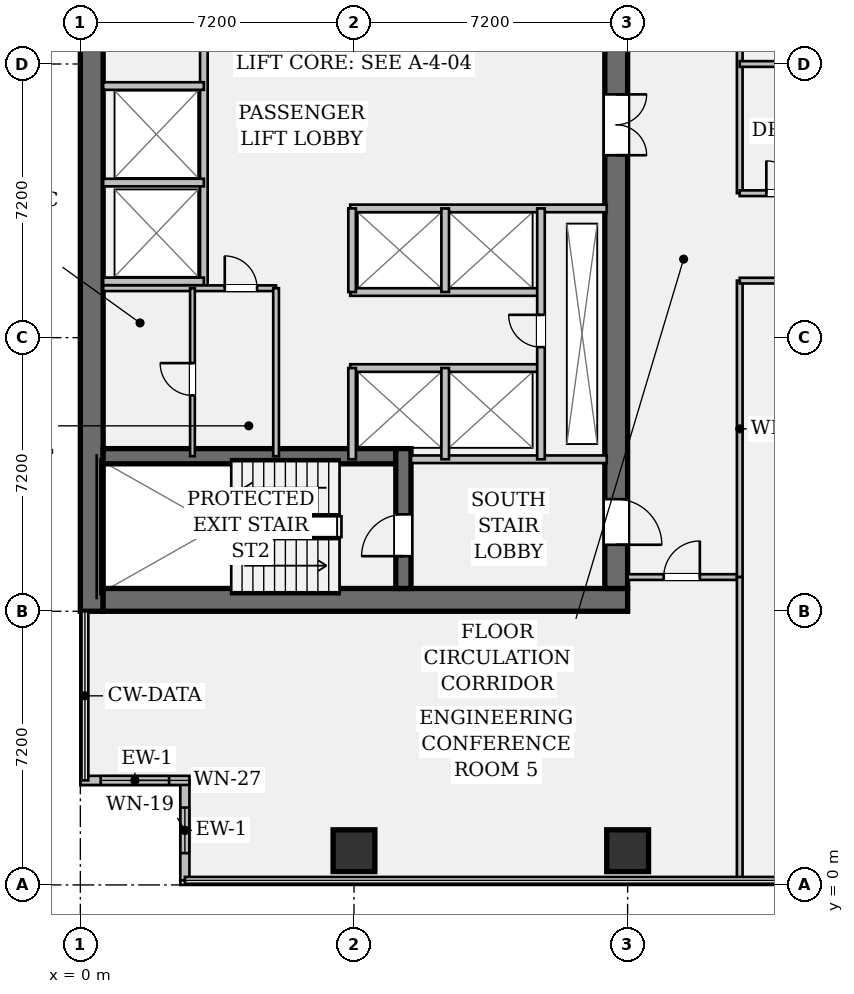
"""IFC4 building model, lengths in metres.
Left out: names, types, materials, properties, quantities, classifications, styles, units other than length and angle.
Written with IfcOpenShell. Run it as: python <this file> out.ifc"""

import sys

from ifc_helpers import new_model, si_unit, direction, frame, frame_2d, origin, origin_2d, place, context, subcontext, project, spatial, rectangle, hollow_rectangle, extrude, element, fill, save


model = new_model("IFC4")
c1 = context("Model", 3, precision=1e-05, world=origin(), true_north=direction((0.0, 1.0)))
c2 = subcontext(c1, "Body", "Model", "MODEL_VIEW")
j1 = project(units=[si_unit("LENGTHUNIT", "METRE"), si_unit("PLANEANGLEUNIT", "RADIAN")], contexts=[c1])
p1 = place(None, origin())
s1 = spatial("IfcSite", under=j1, at=p1, CompositionType="ELEMENT")
p2 = place(p1, origin())
s2 = spatial("IfcBuilding", under=s1, at=p2, CompositionType="ELEMENT")
p3 = place(p2, frame((0.0, 0.0, 42.7)))
s3 = spatial("IfcBuildingStorey", under=s2, at=p3, CompositionType="ELEMENT", Elevation=42.7)
p4 = place(p3, frame((0.3, 7.2, 0.0), z_axis=(0.0, 0.0, 1.0), x_axis=(0.0, 1.0, 0.0)))
e1 = element("IfcWall", 1, at=p4, inside=s3, PredefinedType="SHEAR", context=c2, shape_type="SweptSolid", body=[
    extrude(rectangle(XDim=28.8, YDim=0.6, at=frame_2d((14.4, 0.0))), origin(), (0.0, 0.0, 1.0), 3.57),
])
p5 = place(p3, frame((0.6, 7.5, 0.0), z_axis=(0.0, 0.0, 1.0), x_axis=(1.0, 0.0, 0.0)))
e2 = element("IfcWall", 2, at=p5, inside=s3, PredefinedType="SHEAR", context=c2, shape_type="SweptSolid", body=[
    extrude(rectangle(XDim=13.8, YDim=0.6, at=frame_2d((6.9, 0.0))), origin(), (0.0, 0.0, 1.0), 3.57),
])
p6 = place(p3, frame((14.1, 35.4, 0.0), z_axis=(0.0, 0.0, 1.0), x_axis=(0.0, -1.0, 0.0)))
e3 = element("IfcWall", 3, at=p6, inside=s3, PredefinedType="SHEAR", context=c2, shape_type="SweptSolid", body=[
    extrude(rectangle(XDim=27.6, YDim=0.6, at=frame_2d((13.8, 0.0))), origin(), (0.0, 0.0, 1.0), 3.57),
])
p7 = place(p6, frame((1.3, 0.0, 0.0)))
e4 = element("IfcOpeningElement", 4, at=p7, cuts=e3, PredefinedType="OPENING", context=c2, shape_type="SweptSolid", body=[
    extrude(rectangle(XDim=1.2, YDim=2.15, at=frame_2d((0.6, 1.075))), frame((0.0, 0.312, 0.0), z_axis=(0.0, -1.0, 0.0), x_axis=(1.0, 0.0, 0.0)), (0.0, 0.0, 1.0), 0.624),
])
p8 = place(p6, frame((25.25, 0.0, 0.0)))
e5 = element("IfcOpeningElement", 5, at=p8, cuts=e3, PredefinedType="OPENING", context=c2, shape_type="SweptSolid", body=[
    extrude(rectangle(XDim=1.2, YDim=2.15, at=frame_2d((0.6, 1.075))), frame((0.0, 0.312, 0.0), z_axis=(0.0, -1.0, 0.0), x_axis=(1.0, 0.0, 0.0)), (0.0, 0.0, 1.0), 0.624),
])
p9 = place(p6, frame((14.6, 0.0, 0.0)))
e6 = element("IfcOpeningElement", 6, at=p9, cuts=e3, PredefinedType="OPENING", context=c2, shape_type="SweptSolid", body=[
    extrude(rectangle(XDim=1.6, YDim=2.2, at=frame_2d((0.8, 1.1))), frame((0.0, 0.312, 0.0), z_axis=(0.0, -1.0, 0.0), x_axis=(1.0, 0.0, 0.0)), (0.0, 0.0, 1.0), 0.624),
])
p10 = place(p3, frame((0.6, 11.28, 0.0), z_axis=(0.0, 0.0, 1.0), x_axis=(1.0, 0.0, 0.0)))
e7 = element("IfcWall", 7, at=p10, inside=s3, PredefinedType="SHEAR", context=c2, shape_type="SweptSolid", body=[
    extrude(rectangle(XDim=7.7, YDim=0.4, at=frame_2d((3.85, 0.0))), origin(), (0.0, 0.0, 1.0), 3.57),
])
p11 = place(p3, frame((8.5, 7.8, 0.0), z_axis=(0.0, 0.0, 1.0), x_axis=(0.0, 1.0, 0.0)))
e8 = element("IfcWall", 8, at=p11, inside=s3, PredefinedType="SHEAR", context=c2, shape_type="SweptSolid", body=[
    extrude(rectangle(XDim=3.68, YDim=0.4, at=frame_2d((1.84, 0.0))), origin(), (0.0, 0.0, 1.0), 3.57),
])
p12 = place(p11, frame((0.85, 0.0, 0.0)))
e9 = element("IfcOpeningElement", 9, at=p12, cuts=e8, PredefinedType="OPENING", context=c2, shape_type="SweptSolid", body=[
    extrude(rectangle(XDim=1.1, YDim=2.15, at=frame_2d((0.55, 1.075))), frame((0.0, 0.212, 0.0), z_axis=(0.0, -1.0, 0.0), x_axis=(1.0, 0.0, 0.0)), (0.0, 0.0, 1.0), 0.424),
])
for number, where, z_axis, x_axis in (
    (10, (7.2, 0.9, 0.0), (0.0, 0.0, 1.0), (1.0, 0.0, 0.0)),
    (11, (14.4, 0.9, 0.0), (0.0, 0.0, 1.0), (1.0, 0.0, 0.0)),
):
    element("IfcColumn", number, at=place(p3, frame(where, z_axis=z_axis, x_axis=x_axis)), inside=s3, PredefinedType="COLUMN", context=c2, shape_type="SweptSolid", body=[
        extrude(hollow_rectangle(XDim=1.1, YDim=1.1, WallThickness=0.07, at=origin_2d()), origin(), (0.0, 0.0, 1.0), 3.57),
    ])
p13 = place(p3, frame((2.75, 0.12, 0.0), z_axis=(0.0, 0.0, 1.0), x_axis=(0.0, 1.0, 0.0)))
e12 = element("IfcWall", 12, at=p13, inside=s3, PredefinedType="STANDARD", context=c2, shape_type="SweptSolid", body=[
    extrude(rectangle(XDim=2.63, YDim=0.24, at=frame_2d((1.315, 0.0))), origin(), (0.0, 0.0, 1.0), 3.57),
])
p14 = place(p13, frame((0.715, 0.0, 0.95)))
e13 = element("IfcOpeningElement", 13, at=p14, cuts=e12, PredefinedType="OPENING", context=c2, shape_type="SweptSolid", body=[
    extrude(rectangle(XDim=1.2, YDim=1.8, at=frame_2d((0.6, 0.9))), frame((0.0, 0.132, 0.0), z_axis=(0.0, -1.0, 0.0), x_axis=(1.0, 0.0, 0.0)), (0.0, 0.0, 1.0), 0.264),
])
p15 = place(p3, frame((2.87, 2.75, 0.0), z_axis=(0.0, 0.0, 1.0), x_axis=(-1.0, 0.0, 0.0)))
e14 = element("IfcWall", 14, at=p15, inside=s3, PredefinedType="STANDARD", context=c2, shape_type="SweptSolid", body=[
    extrude(rectangle(XDim=2.87, YDim=0.24, at=frame_2d((1.435, 0.0))), origin(), (0.0, 0.0, 1.0), 3.57),
])
p16 = place(p15, frame((0.535, 0.0, 0.95)))
e15 = element("IfcOpeningElement", 15, at=p16, cuts=e14, PredefinedType="OPENING", context=c2, shape_type="SweptSolid", body=[
    extrude(rectangle(XDim=1.8, YDim=1.35, at=frame_2d((0.9, 0.675))), frame((0.0, 0.132, 0.0), z_axis=(0.0, -1.0, 0.0), x_axis=(1.0, 0.0, 0.0)), (0.0, 0.0, 1.0), 0.264),
])
p17 = place(p3, frame((8.7, 11.2, 0.0), z_axis=(0.0, 0.0, 1.0), x_axis=(1.0, 0.0, 0.0)))
e16 = element("IfcWall", 16, at=p17, inside=s3, PredefinedType="PARTITIONING", context=c2, shape_type="SweptSolid", body=[
    extrude(rectangle(XDim=5.15, YDim=0.2, at=frame_2d((2.575, 0.0))), origin(), (0.0, 0.0, 1.0), 3.57),
])
p18 = place(p3, frame((3.25, 15.7, 0.0), z_axis=(0.0, 0.0, 1.0), x_axis=(0.0, 1.0, 0.0)))
e17 = element("IfcWall", 17, at=p18, inside=s3, PredefinedType="PARTITIONING", context=c2, shape_type="SweptSolid", body=[
    extrude(rectangle(XDim=13.08, YDim=0.2, at=frame_2d((6.54, 0.0))), origin(), (0.0, 0.0, 1.0), 3.57),
])
for number, where, z_axis, x_axis in (
    (18, (0.6, 15.88, 0.0), (0.0, 0.0, 1.0), (1.0, 0.0, 0.0)),
    (19, (0.6, 18.48, 0.0), (0.0, 0.0, 1.0), (1.0, 0.0, 0.0)),
    (20, (0.6, 21.02, 0.0), (0.0, 0.0, 1.0), (1.0, 0.0, 0.0)),
):
    element("IfcWall", number, at=place(p3, frame(where, z_axis=z_axis, x_axis=x_axis)), inside=s3, PredefinedType="PARTITIONING", context=c2, shape_type="SweptSolid", body=[
        extrude(rectangle(XDim=2.65, YDim=0.2, at=frame_2d((1.325, 0.0))), origin(), (0.0, 0.0, 1.0), 3.57),
    ])
p19 = place(p3, frame((7.1, 17.8, 0.0), z_axis=(0.0, 0.0, 1.0), x_axis=(1.0, 0.0, 0.0)))
e21 = element("IfcWall", 21, at=p19, inside=s3, PredefinedType="PARTITIONING", context=c2, shape_type="SweptSolid", body=[
    extrude(rectangle(XDim=6.75, YDim=0.2, at=frame_2d((3.375, 0.0))), origin(), (0.0, 0.0, 1.0), 3.57),
])
for number, where, z_axis, x_axis in (
    (22, (7.1, 15.6, 0.0), (0.0, 0.0, 1.0), (1.0, 0.0, 0.0)),
    (23, (7.1, 13.6, 0.0), (0.0, 0.0, 1.0), (1.0, 0.0, 0.0)),
):
    element("IfcWall", number, at=place(p3, frame(where, z_axis=z_axis, x_axis=x_axis)), inside=s3, PredefinedType="PARTITIONING", context=c2, shape_type="SweptSolid", body=[
        extrude(rectangle(XDim=5.02, YDim=0.2, at=frame_2d((2.51, 0.0))), origin(), (0.0, 0.0, 1.0), 3.57),
    ])
p20 = place(p3, frame((7.15, 15.6, 0.0), z_axis=(0.0, 0.0, 1.0), x_axis=(0.0, 1.0, 0.0)))
e24 = element("IfcWall", 24, at=p20, inside=s3, PredefinedType="PARTITIONING", context=c2, shape_type="SweptSolid", body=[
    extrude(rectangle(XDim=2.2, YDim=0.2, at=frame_2d((1.1, 0.0))), origin(), (0.0, 0.0, 1.0), 3.57),
])
p21 = place(p3, frame((7.15, 11.2, 0.0), z_axis=(0.0, 0.0, 1.0), x_axis=(0.0, 1.0, 0.0)))
e25 = element("IfcWall", 25, at=p21, inside=s3, PredefinedType="PARTITIONING", context=c2, shape_type="SweptSolid", body=[
    extrude(rectangle(XDim=2.4, YDim=0.2, at=frame_2d((1.2, 0.0))), origin(), (0.0, 0.0, 1.0), 3.57),
])
p22 = place(p3, frame((9.6, 15.6, 0.0), z_axis=(0.0, 0.0, 1.0), x_axis=(0.0, 1.0, 0.0)))
e26 = element("IfcWall", 26, at=p22, inside=s3, PredefinedType="PARTITIONING", context=c2, shape_type="SweptSolid", body=[
    extrude(rectangle(XDim=2.2, YDim=0.2, at=frame_2d((1.1, 0.0))), origin(), (0.0, 0.0, 1.0), 3.57),
])
p23 = place(p3, frame((9.6, 11.2, 0.0), z_axis=(0.0, 0.0, 1.0), x_axis=(0.0, 1.0, 0.0)))
e27 = element("IfcWall", 27, at=p23, inside=s3, PredefinedType="PARTITIONING", context=c2, shape_type="SweptSolid", body=[
    extrude(rectangle(XDim=2.4, YDim=0.2, at=frame_2d((1.2, 0.0))), origin(), (0.0, 0.0, 1.0), 3.57),
])
p24 = place(p3, frame((12.12, 11.2, 0.0), z_axis=(0.0, 0.0, 1.0), x_axis=(0.0, 1.0, 0.0)))
e28 = element("IfcWall", 28, at=p24, inside=s3, PredefinedType="PARTITIONING", context=c2, shape_type="SweptSolid", body=[
    extrude(rectangle(XDim=6.6, YDim=0.2, at=frame_2d((3.3, 0.0))), origin(), (0.0, 0.0, 1.0), 3.57),
])
p25 = place(p24, frame((2.95, 0.0, 0.0)))
e29 = element("IfcOpeningElement", 29, at=p25, cuts=e28, PredefinedType="OPENING", context=c2, shape_type="SweptSolid", body=[
    extrude(rectangle(XDim=0.85, YDim=2.15, at=frame_2d((0.425, 1.075))), frame((0.0, 0.112, 0.0), z_axis=(0.0, -1.0, 0.0), x_axis=(1.0, 0.0, 0.0)), (0.0, 0.0, 1.0), 0.224),
])
p26 = place(p3, frame((0.6, 15.7, 0.0), z_axis=(0.0, 0.0, 1.0), x_axis=(1.0, 0.0, 0.0)))
e30 = element("IfcWall", 30, at=p26, inside=s3, PredefinedType="PARTITIONING", context=c2, shape_type="SweptSolid", body=[
    extrude(rectangle(XDim=4.55, YDim=0.15, at=frame_2d((2.275, 0.0))), origin(), (0.0, 0.0, 1.0), 3.57),
])
p27 = place(p26, frame((3.2, 0.0, 0.0)))
e31 = element("IfcOpeningElement", 31, at=p27, cuts=e30, PredefinedType="OPENING", context=c2, shape_type="SweptSolid", body=[
    extrude(rectangle(XDim=0.85, YDim=2.15, at=frame_2d((0.425, 1.075))), frame((0.0, 0.087, 0.0), z_axis=(0.0, -1.0, 0.0), x_axis=(1.0, 0.0, 0.0)), (0.0, 0.0, 1.0), 0.174),
])
p28 = place(p3, frame((5.15, 11.28, 0.0), z_axis=(0.0, 0.0, 1.0), x_axis=(0.0, 1.0, 0.0)))
e32 = element("IfcWall", 32, at=p28, inside=s3, PredefinedType="PARTITIONING", context=c2, shape_type="SweptSolid", body=[
    extrude(rectangle(XDim=4.42, YDim=0.15, at=frame_2d((2.21, 0.0))), origin(), (0.0, 0.0, 1.0), 3.57),
])
p29 = place(p3, frame((2.95, 11.28, 0.0), z_axis=(0.0, 0.0, 1.0), x_axis=(0.0, 1.0, 0.0)))
e33 = element("IfcWall", 33, at=p29, inside=s3, PredefinedType="PARTITIONING", context=c2, shape_type="SweptSolid", body=[
    extrude(rectangle(XDim=4.42, YDim=0.125, at=frame_2d((2.21, 0.0))), origin(), (0.0, 0.0, 1.0), 3.57),
])
p30 = place(p29, frame((1.6, 0.0, 0.0)))
e34 = element("IfcOpeningElement", 34, at=p30, cuts=e33, PredefinedType="OPENING", context=c2, shape_type="SweptSolid", body=[
    extrude(rectangle(XDim=0.85, YDim=2.15, at=frame_2d((0.425, 1.075))), frame((0.0, 0.074, 0.0), z_axis=(0.0, -1.0, 0.0), x_axis=(1.0, 0.0, 0.0)), (0.0, 0.0, 1.0), 0.149),
])
p31 = place(p3, frame((14.4, 8.1, 0.0), z_axis=(0.0, 0.0, 1.0), x_axis=(1.0, 0.0, 0.0)))
e35 = element("IfcWall", 35, at=p31, inside=s3, PredefinedType="PARTITIONING", context=c2, shape_type="SweptSolid", body=[
    extrude(rectangle(XDim=2.95, YDim=0.15, at=frame_2d((1.475, 0.0))), origin(), (0.0, 0.0, 1.0), 3.088),
])
p32 = place(p31, frame((0.95, 0.0, 0.0)))
e36 = element("IfcOpeningElement", 36, at=p32, cuts=e35, PredefinedType="OPENING", context=c2, shape_type="SweptSolid", body=[
    extrude(rectangle(XDim=0.95, YDim=2.15, at=frame_2d((0.475, 1.075))), frame((0.0, 0.087, 0.0), z_axis=(0.0, -1.0, 0.0), x_axis=(1.0, 0.0, 0.0)), (0.0, 0.0, 1.0), 0.174),
])
p33 = place(p3, frame((17.35, 8.1, 0.0), z_axis=(0.0, 0.0, 1.0), x_axis=(0.0, 1.0, 0.0)))
e37 = element("IfcWall", 37, at=p33, inside=s3, PredefinedType="PARTITIONING", context=c2, shape_type="SweptSolid", body=[
    extrude(rectangle(XDim=7.8, YDim=0.15, at=frame_2d((3.9, 0.0))), origin(), (0.0, 0.0, 1.0), 2.699),
])
p34 = place(p3, frame((17.35, 18.2, 0.0), z_axis=(0.0, 0.0, 1.0), x_axis=(0.0, 1.0, 0.0)))
e38 = element("IfcWall", 38, at=p34, inside=s3, PredefinedType="PARTITIONING", context=c2, shape_type="SweptSolid", body=[
    extrude(rectangle(XDim=17.7, YDim=0.15, at=frame_2d((8.85, 0.0))), origin(), (0.0, 0.0, 1.0), 2.699),
])
p35 = place(p34, frame((4.3, 0.0, 0.0)))
e39 = element("IfcOpeningElement", 39, at=p35, cuts=e38, PredefinedType="OPENING", context=c2, shape_type="SweptSolid", body=[
    extrude(rectangle(XDim=0.95, YDim=2.15, at=frame_2d((0.475, 1.075))), frame((0.0, 0.087, 0.0), z_axis=(0.0, -1.0, 0.0), x_axis=(1.0, 0.0, 0.0)), (0.0, 0.0, 1.0), 0.174),
])
p36 = place(p34, frame((8.4, 0.0, 0.0)))
e40 = element("IfcOpeningElement", 40, at=p36, cuts=e38, PredefinedType="OPENING", context=c2, shape_type="SweptSolid", body=[
    extrude(rectangle(XDim=1.0, YDim=2.15, at=frame_2d((0.5, 1.075))), frame((0.0, 0.087, 0.0), z_axis=(0.0, -1.0, 0.0), x_axis=(1.0, 0.0, 0.0)), (0.0, 0.0, 1.0), 0.174),
])
p37 = place(p3, frame((17.35, 15.9, 0.0), z_axis=(0.0, 0.0, 1.0), x_axis=(1.0, 0.0, 0.0)))
e41 = element("IfcWall", 41, at=p37, inside=s3, PredefinedType="PARTITIONING", context=c2, shape_type="SweptSolid", body=[
    extrude(rectangle(XDim=18.05, YDim=0.15, at=frame_2d((9.025, 0.0))), origin(), (0.0, 0.0, 1.0), 2.699),
])
p38 = place(p37, frame((2.82, 0.0, 0.0)))
e42 = element("IfcOpeningElement", 42, at=p38, cuts=e41, PredefinedType="OPENING", context=c2, shape_type="SweptSolid", body=[
    extrude(rectangle(XDim=0.95, YDim=2.15, at=frame_2d((0.475, 1.075))), frame((0.0, 0.087, 0.0), z_axis=(0.0, -1.0, 0.0), x_axis=(1.0, 0.0, 0.0)), (0.0, 0.0, 1.0), 0.174),
])
p39 = place(p37, frame((9.75, 0.0, 0.0)))
e43 = element("IfcOpeningElement", 43, at=p39, cuts=e41, PredefinedType="OPENING", context=c2, shape_type="SweptSolid", body=[
    extrude(rectangle(XDim=0.95, YDim=2.15, at=frame_2d((0.475, 1.075))), frame((0.0, 0.087, 0.0), z_axis=(0.0, -1.0, 0.0), x_axis=(1.0, 0.0, 0.0)), (0.0, 0.0, 1.0), 0.174),
])
p40 = place(p37, frame((15.45, 0.0, 0.0)))
e44 = element("IfcOpeningElement", 44, at=p40, cuts=e41, PredefinedType="OPENING", context=c2, shape_type="SweptSolid", body=[
    extrude(rectangle(XDim=0.95, YDim=2.15, at=frame_2d((0.475, 1.075))), frame((0.0, 0.087, 0.0), z_axis=(0.0, -1.0, 0.0), x_axis=(1.0, 0.0, 0.0)), (0.0, 0.0, 1.0), 0.174),
])
p41 = place(p3, frame((17.35, 18.2, 0.0), z_axis=(0.0, 0.0, 1.0), x_axis=(1.0, 0.0, 0.0)))
e45 = element("IfcWall", 45, at=p41, inside=s3, PredefinedType="PARTITIONING", context=c2, shape_type="SweptSolid", body=[
    extrude(rectangle(XDim=18.05, YDim=0.15, at=frame_2d((9.025, 0.0))), origin(), (0.0, 0.0, 1.0), 2.699),
])
p42 = place(p41, frame((0.7, 0.0, 0.0)))
e46 = element("IfcOpeningElement", 46, at=p42, cuts=e45, PredefinedType="OPENING", context=c2, shape_type="SweptSolid", body=[
    extrude(rectangle(XDim=0.85, YDim=2.15, at=frame_2d((0.425, 1.075))), frame((0.0, 0.087, 0.0), z_axis=(0.0, -1.0, 0.0), x_axis=(1.0, 0.0, 0.0)), (0.0, 0.0, 1.0), 0.174),
])
p43 = place(p41, frame((3.95, 0.0, 0.0)))
e47 = element("IfcOpeningElement", 47, at=p43, cuts=e45, PredefinedType="OPENING", context=c2, shape_type="SweptSolid", body=[
    extrude(rectangle(XDim=0.85, YDim=2.15, at=frame_2d((0.425, 1.075))), frame((0.0, 0.087, 0.0), z_axis=(0.0, -1.0, 0.0), x_axis=(1.0, 0.0, 0.0)), (0.0, 0.0, 1.0), 0.174),
])
p44 = place(p41, frame((6.46, 0.0, 0.0)))
e48 = element("IfcOpeningElement", 48, at=p44, cuts=e45, PredefinedType="OPENING", context=c2, shape_type="SweptSolid", body=[
    extrude(rectangle(XDim=0.85, YDim=2.15, at=frame_2d((0.425, 1.075))), frame((0.0, 0.087, 0.0), z_axis=(0.0, -1.0, 0.0), x_axis=(1.0, 0.0, 0.0)), (0.0, 0.0, 1.0), 0.174),
])
p45 = place(p41, frame((9.5, 0.0, 0.0)))
e49 = element("IfcOpeningElement", 49, at=p45, cuts=e45, PredefinedType="OPENING", context=c2, shape_type="SweptSolid", body=[
    extrude(rectangle(XDim=0.95, YDim=2.15, at=frame_2d((0.475, 1.075))), frame((0.0, 0.087, 0.0), z_axis=(0.0, -1.0, 0.0), x_axis=(1.0, 0.0, 0.0)), (0.0, 0.0, 1.0), 0.174),
])
p46 = place(p3, frame((17.35, 21.6, 0.0), z_axis=(0.0, 0.0, 1.0), x_axis=(1.0, 0.0, 0.0)))
e50 = element("IfcWall", 50, at=p46, inside=s3, PredefinedType="PARTITIONING", context=c2, shape_type="SweptSolid", body=[
    extrude(rectangle(XDim=8.85, YDim=0.15, at=frame_2d((4.425, 0.0))), origin(), (0.0, 0.0, 1.0), 2.699),
])
p47 = place(p3, frame((17.35, 0.12, 0.0), z_axis=(0.0, 0.0, 1.0), x_axis=(0.0, 1.0, 0.0)))
e51 = element("IfcWall", 51, at=p47, inside=s3, PredefinedType="PARTITIONING", context=c2, shape_type="SweptSolid", body=[
    extrude(rectangle(XDim=7.98, YDim=0.15, at=frame_2d((3.99, 0.0))), origin(), (0.0, 0.0, 1.0), 2.699),
])
p48 = place(p14, origin())
e52 = element("IfcWindow", 52, at=p48, inside=s3, PartitioningType="SINGLE_PANEL", PredefinedType="WINDOW", context=c2, shape_type="SweptSolid", body=[
    extrude(rectangle(XDim=1.2, YDim=1.8, at=frame_2d((0.6, 0.9))), frame((0.0, 0.03, 0.0), z_axis=(0.0, -1.0, 0.0), x_axis=(1.0, 0.0, 0.0)), (0.0, 0.0, 1.0), 0.06),
])
fill(e13, e52)
p49 = place(p16, origin())
e53 = element("IfcWindow", 53, at=p49, inside=s3, PartitioningType="SINGLE_PANEL", PredefinedType="WINDOW", context=c2, shape_type="SweptSolid", body=[
    extrude(rectangle(XDim=1.8, YDim=1.35, at=frame_2d((0.9, 0.675))), frame((0.0, 0.03, 0.0), z_axis=(0.0, -1.0, 0.0), x_axis=(1.0, 0.0, 0.0)), (0.0, 0.0, 1.0), 0.06),
])
fill(e15, e53)
p50 = place(p12, origin())
e54 = element("IfcDoor", 54, at=p50, inside=s3, OperationType="SINGLE_SWING_LEFT", PredefinedType="DOOR", context=c2, shape_type="SweptSolid", body=[
    extrude(rectangle(XDim=1.1, YDim=2.15, at=frame_2d((0.55, 1.075))), frame((0.0, 0.025, 0.0), z_axis=(0.0, -1.0, 0.0), x_axis=(1.0, 0.0, 0.0)), (0.0, 0.0, 1.0), 0.05),
])
fill(e9, e54)
p51 = place(p8, origin())
e55 = element("IfcDoor", 55, at=p51, inside=s3, OperationType="SINGLE_SWING_RIGHT", PredefinedType="DOOR", context=c2, shape_type="SweptSolid", body=[
    extrude(rectangle(XDim=1.2, YDim=2.15, at=frame_2d((0.6, 1.075))), frame((0.0, 0.025, 0.0), z_axis=(0.0, -1.0, 0.0), x_axis=(1.0, 0.0, 0.0)), (0.0, 0.0, 1.0), 0.05),
])
fill(e5, e55)
p52 = place(p9, origin())
e56 = element("IfcDoor", 56, at=p52, inside=s3, OperationType="DOUBLE_DOOR_SINGLE_SWING", PredefinedType="DOOR", context=c2, shape_type="SweptSolid", body=[
    extrude(rectangle(XDim=1.6, YDim=2.2, at=frame_2d((0.8, 1.1))), frame((0.0, 0.025, 0.0), z_axis=(0.0, -1.0, 0.0), x_axis=(1.0, 0.0, 0.0)), (0.0, 0.0, 1.0), 0.05),
])
fill(e6, e56)
p53 = place(p25, origin())
e57 = element("IfcDoor", 57, at=p53, inside=s3, OperationType="SINGLE_SWING_RIGHT", PredefinedType="DOOR", context=c2, shape_type="SweptSolid", body=[
    extrude(rectangle(XDim=0.85, YDim=2.15, at=frame_2d((0.425, 1.075))), frame((0.0, 0.025, 0.0), z_axis=(0.0, -1.0, 0.0), x_axis=(1.0, 0.0, 0.0)), (0.0, 0.0, 1.0), 0.05),
])
fill(e29, e57)
p54 = place(p27, origin())
e58 = element("IfcDoor", 58, at=p54, inside=s3, OperationType="SINGLE_SWING_LEFT", PredefinedType="DOOR", context=c2, shape_type="SweptSolid", body=[
    extrude(rectangle(XDim=0.85, YDim=2.15, at=frame_2d((0.425, 1.075))), frame((0.0, 0.025, 0.0), z_axis=(0.0, -1.0, 0.0), x_axis=(1.0, 0.0, 0.0)), (0.0, 0.0, 1.0), 0.05),
])
fill(e31, e58)
p55 = place(p30, origin())
e59 = element("IfcDoor", 59, at=p55, inside=s3, OperationType="SINGLE_SWING_RIGHT", PredefinedType="DOOR", context=c2, shape_type="SweptSolid", body=[
    extrude(rectangle(XDim=0.85, YDim=2.15, at=frame_2d((0.425, 1.075))), frame((0.0, 0.025, 0.0), z_axis=(0.0, -1.0, 0.0), x_axis=(1.0, 0.0, 0.0)), (0.0, 0.0, 1.0), 0.05),
])
fill(e34, e59)
p56 = place(p42, origin())
e60 = element("IfcDoor", 60, at=p56, inside=s3, OperationType="SINGLE_SWING_LEFT", PredefinedType="DOOR", context=c2, shape_type="SweptSolid", body=[
    extrude(rectangle(XDim=0.85, YDim=2.15, at=frame_2d((0.425, 1.075))), frame((0.0, 0.025, 0.0), z_axis=(0.0, -1.0, 0.0), x_axis=(1.0, 0.0, 0.0)), (0.0, 0.0, 1.0), 0.05),
])
fill(e46, e60)
p57 = place(p32, origin())
e61 = element("IfcDoor", 61, at=p57, inside=s3, OperationType="SINGLE_SWING_RIGHT", PredefinedType="DOOR", context=c2, shape_type="SweptSolid", body=[
    extrude(rectangle(XDim=0.95, YDim=2.15, at=frame_2d((0.475, 1.075))), frame((0.0, 0.025, 0.0), z_axis=(0.0, -1.0, 0.0), x_axis=(1.0, 0.0, 0.0)), (0.0, 0.0, 1.0), 0.05),
])
fill(e36, e61)
save(model, sys.argv[1])
